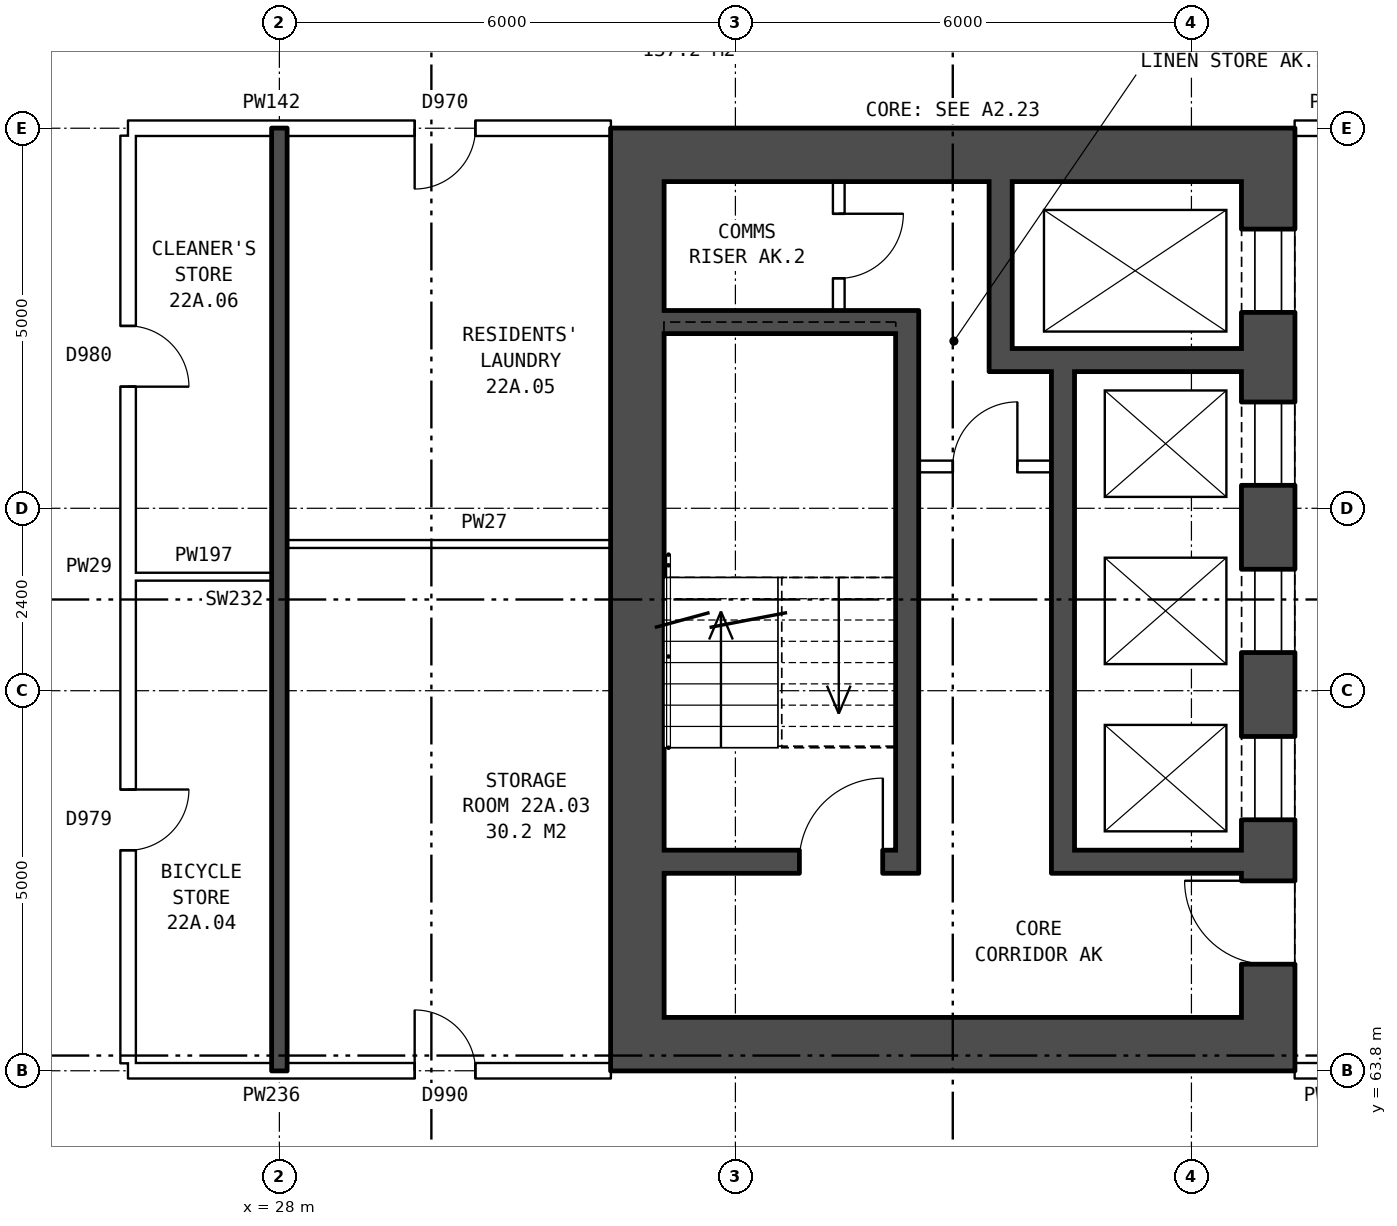
"""IFC4 building model, lengths in metres.
Left out: names, types, materials, properties, quantities, classifications, styles, units other than length and angle.
Written with IfcOpenShell. Run it as: python <this file> out.ifc"""

import sys

from ifc_helpers import new_model, si_unit, direction, frame, frame_2d, origin, place, context, subcontext, project, spatial, rectangle, extrude, element, fill, save


model = new_model("IFC4")
c1 = context("Model", 3, precision=1e-05, world=origin(), true_north=direction((0.0, 1.0)))
c2 = subcontext(c1, "Body", "Model", "MODEL_VIEW")
j1 = project(units=[si_unit("LENGTHUNIT", "METRE"), si_unit("PLANEANGLEUNIT", "RADIAN")], contexts=[c1])
p1 = place(None, origin())
s1 = spatial("IfcSite", under=j1, at=p1, CompositionType="ELEMENT")
p2 = place(p1, origin())
s2 = spatial("IfcBuilding", under=s1, at=p2, CompositionType="ELEMENT")
p3 = place(p2, frame((0.0, 0.0, 80.9)))
s3 = spatial("IfcBuildingStorey", under=s2, at=p3, CompositionType="ELEMENT", Elevation=80.9)
p4 = place(p3, frame((41.01, 75.5, 0.0), z_axis=(0.0, 0.0, 1.0), x_axis=(0.0, -1.0, 0.0)))
e1 = element("IfcWall", 1, at=p4, inside=s3, PredefinedType="SHEAR", context=c2, shape_type="SweptSolid", body=[
    extrude(rectangle(XDim=11.0, YDim=0.7, at=frame_2d((5.5, 0.0))), origin(), (0.0, 0.0, 1.0), 2.85),
])
p5 = place(p4, frame((0.625, 0.0, 0.0)))
e2 = element("IfcOpeningElement", 2, at=p5, cuts=e1, PredefinedType="OPENING", context=c2, shape_type="SweptSolid", body=[
    extrude(rectangle(XDim=1.1, YDim=2.1, at=frame_2d((0.55, 1.05))), frame((0.0, 0.36, 0.0), z_axis=(0.0, -1.0, 0.0), x_axis=(1.0, 0.0, 0.0)), (0.0, 0.0, 1.0), 0.72),
])
p6 = place(p4, frame((2.9, 0.0, 0.0)))
e3 = element("IfcOpeningElement", 3, at=p6, cuts=e1, PredefinedType="OPENING", context=c2, shape_type="SweptSolid", body=[
    extrude(rectangle(XDim=1.1, YDim=2.1, at=frame_2d((0.55, 1.05))), frame((0.0, 0.36, 0.0), z_axis=(0.0, -1.0, 0.0), x_axis=(1.0, 0.0, 0.0)), (0.0, 0.0, 1.0), 0.72),
])
p7 = place(p4, frame((5.1, 0.0, 0.0)))
e4 = element("IfcOpeningElement", 4, at=p7, cuts=e1, PredefinedType="OPENING", context=c2, shape_type="SweptSolid", body=[
    extrude(rectangle(XDim=1.1, YDim=2.1, at=frame_2d((0.55, 1.05))), frame((0.0, 0.36, 0.0), z_axis=(0.0, -1.0, 0.0), x_axis=(1.0, 0.0, 0.0)), (0.0, 0.0, 1.0), 0.72),
])
p8 = place(p4, frame((7.3, 0.0, 0.0)))
e5 = element("IfcOpeningElement", 5, at=p8, cuts=e1, PredefinedType="OPENING", context=c2, shape_type="SweptSolid", body=[
    extrude(rectangle(XDim=1.1, YDim=2.1, at=frame_2d((0.55, 1.05))), frame((0.0, 0.36, 0.0), z_axis=(0.0, -1.0, 0.0), x_axis=(1.0, 0.0, 0.0)), (0.0, 0.0, 1.0), 0.72),
])
p9 = place(p4, frame((9.2, 0.0, 0.0)))
e6 = element("IfcOpeningElement", 6, at=p9, cuts=e1, PredefinedType="OPENING", context=c2, shape_type="SweptSolid", body=[
    extrude(rectangle(XDim=1.1, YDim=2.1, at=frame_2d((0.55, 1.05))), frame((0.0, 0.36, 0.0), z_axis=(0.0, -1.0, 0.0), x_axis=(1.0, 0.0, 0.0)), (0.0, 0.0, 1.0), 0.72),
])
p10 = place(p3, frame((32.71, 75.5, 0.0), z_axis=(0.0, 0.0, 1.0), x_axis=(0.0, -1.0, 0.0)))
e7 = element("IfcWall", 7, at=p10, inside=s3, PredefinedType="SHEAR", context=c2, shape_type="SweptSolid", body=[
    extrude(rectangle(XDim=11.0, YDim=0.7, at=frame_2d((5.5, 0.0))), origin(), (0.0, 0.0, 1.0), 2.85),
])
for number, where, z_axis, x_axis in (
    (8, (41.36, 75.85, 0.0), (0.0, 0.0, 1.0), (-1.0, 0.0, 0.0)),
    (9, (41.36, 64.15, 0.0), (0.0, 0.0, 1.0), (-1.0, 0.0, 0.0)),
):
    element("IfcWall", number, at=place(p3, frame(where, z_axis=z_axis, x_axis=x_axis)), inside=s3, PredefinedType="SHEAR", context=c2, shape_type="SweptSolid", body=[
        extrude(rectangle(XDim=9.0, YDim=0.7, at=frame_2d((4.5, 0.0))), origin(), (0.0, 0.0, 1.0), 2.85),
    ])
p11 = place(p3, frame((36.11, 73.65, 0.0), z_axis=(0.0, 0.0, 1.0), x_axis=(-1.0, 0.0, 0.0)))
e10 = element("IfcWall", 10, at=p11, inside=s3, PredefinedType="SHEAR", context=c2, shape_type="SweptSolid", body=[
    extrude(rectangle(XDim=3.05, YDim=0.3, at=frame_2d((1.525, 0.0))), origin(), (0.0, 0.0, 1.0), 2.85),
])
p12 = place(p3, frame((40.66, 73.15, 0.0), z_axis=(0.0, 0.0, 1.0), x_axis=(-1.0, 0.0, 0.0)))
e11 = element("IfcWall", 11, at=p12, inside=s3, PredefinedType="SHEAR", context=c2, shape_type="SweptSolid", body=[
    extrude(rectangle(XDim=3.32, YDim=0.3, at=frame_2d((1.66, 0.0))), origin(), (0.0, 0.0, 1.0), 2.85),
])
p13 = place(p3, frame((38.16, 71.75, 0.0), z_axis=(0.0, 0.0, 1.0), x_axis=(-1.0, 0.0, 0.0)))
e12 = element("IfcWall", 12, at=p13, inside=s3, PredefinedType="PARTITIONING", context=c2, shape_type="SweptSolid", body=[
    extrude(rectangle(XDim=1.75, YDim=0.15, at=frame_2d((0.875, 0.0))), origin(), (0.0, 0.0, 1.0), 2.85),
])
p14 = place(p13, frame((0.45, 0.0, 0.0)))
e13 = element("IfcOpeningElement", 13, at=p14, cuts=e12, PredefinedType="OPENING", context=c2, shape_type="SweptSolid", body=[
    extrude(rectangle(XDim=0.85, YDim=2.1, at=frame_2d((0.425, 1.05))), frame((0.0, 0.085, 0.0), z_axis=(0.0, -1.0, 0.0), x_axis=(1.0, 0.0, 0.0)), (0.0, 0.0, 1.0), 0.17),
])
p15 = place(p3, frame((40.66, 66.55, 0.0), z_axis=(0.0, 0.0, 1.0), x_axis=(-1.0, 0.0, 0.0)))
e14 = element("IfcWall", 14, at=p15, inside=s3, PredefinedType="SHEAR", context=c2, shape_type="SweptSolid", body=[
    extrude(rectangle(XDim=2.2, YDim=0.3, at=frame_2d((1.1, 0.0))), origin(), (0.0, 0.0, 1.0), 2.85),
])
p16 = place(p3, frame((36.11, 66.55, 0.0), z_axis=(0.0, 0.0, 1.0), x_axis=(-1.0, 0.0, 0.0)))
e15 = element("IfcWall", 15, at=p16, inside=s3, PredefinedType="SHEAR", context=c2, shape_type="SweptSolid", body=[
    extrude(rectangle(XDim=3.05, YDim=0.3, at=frame_2d((1.525, 0.0))), origin(), (0.0, 0.0, 1.0), 2.85),
])
p17 = place(p16, frame((0.17, 0.0, 0.0)))
e16 = element("IfcOpeningElement", 16, at=p17, cuts=e15, PredefinedType="OPENING", context=c2, shape_type="SweptSolid", body=[
    extrude(rectangle(XDim=1.1, YDim=2.1, at=frame_2d((0.55, 1.05))), frame((0.0, 0.16, 0.0), z_axis=(0.0, -1.0, 0.0), x_axis=(1.0, 0.0, 0.0)), (0.0, 0.0, 1.0), 0.32),
])
p18 = place(p3, frame((38.31, 73.0, 0.0), z_axis=(0.0, 0.0, 1.0), x_axis=(0.0, -1.0, 0.0)))
e17 = element("IfcWall", 17, at=p18, inside=s3, PredefinedType="SHEAR", context=c2, shape_type="SweptSolid", body=[
    extrude(rectangle(XDim=6.6, YDim=0.3, at=frame_2d((3.3, 0.0))), origin(), (0.0, 0.0, 1.0), 2.85),
])
p19 = place(p3, frame((37.49, 75.5, 0.0), z_axis=(0.0, 0.0, 1.0), x_axis=(0.0, -1.0, 0.0)))
e18 = element("IfcWall", 18, at=p19, inside=s3, PredefinedType="SHEAR", context=c2, shape_type="SweptSolid", body=[
    extrude(rectangle(XDim=2.2, YDim=0.3, at=frame_2d((1.1, 0.0))), origin(), (0.0, 0.0, 1.0), 2.85),
])
p20 = place(p3, frame((36.26, 73.8, 0.0), z_axis=(0.0, 0.0, 1.0), x_axis=(0.0, -1.0, 0.0)))
e19 = element("IfcWall", 19, at=p20, inside=s3, PredefinedType="SHEAR", context=c2, shape_type="SweptSolid", body=[
    extrude(rectangle(XDim=7.4, YDim=0.3, at=frame_2d((3.7, 0.0))), origin(), (0.0, 0.0, 1.0), 2.85),
])
p21 = place(p3, frame((35.36, 75.5, 0.0), z_axis=(0.0, 0.0, 1.0), x_axis=(0.0, -1.0, 0.0)))
e20 = element("IfcWall", 20, at=p21, inside=s3, PredefinedType="PARTITIONING", context=c2, shape_type="SweptSolid", body=[
    extrude(rectangle(XDim=1.7, YDim=0.15, at=frame_2d((0.85, 0.0))), origin(), (0.0, 0.0, 1.0), 2.85),
])
p22 = place(p21, frame((0.425, 0.0, 0.0)))
e21 = element("IfcOpeningElement", 21, at=p22, cuts=e20, PredefinedType="OPENING", context=c2, shape_type="SweptSolid", body=[
    extrude(rectangle(XDim=0.85, YDim=2.1, at=frame_2d((0.425, 1.05))), frame((0.0, 0.085, 0.0), z_axis=(0.0, -1.0, 0.0), x_axis=(1.0, 0.0, 0.0)), (0.0, 0.0, 1.0), 0.17),
])
p23 = place(p3, frame((26.01, 63.8, 0.0), z_axis=(0.0, 0.0, 1.0), x_axis=(1.0, 0.0, 0.0)))
e22 = element("IfcWall", 22, at=p23, inside=s3, PredefinedType="PARTITIONING", context=c2, shape_type="SweptSolid", body=[
    extrude(rectangle(XDim=6.35, YDim=0.2, at=frame_2d((3.175, 0.0))), origin(), (0.0, 0.0, 1.0), 2.85),
])
p24 = place(p23, frame((3.77, 0.0, 0.0)))
e23 = element("IfcOpeningElement", 23, at=p24, cuts=e22, PredefinedType="OPENING", context=c2, shape_type="SweptSolid", body=[
    extrude(rectangle(XDim=0.8, YDim=2.1, at=frame_2d((0.4, 1.05))), frame((0.0, 0.11, 0.0), z_axis=(0.0, -1.0, 0.0), x_axis=(1.0, 0.0, 0.0)), (0.0, 0.0, 1.0), 0.22),
])
p25 = place(p3, frame((41.36, 63.8, 0.0), z_axis=(0.0, 0.0, 1.0), x_axis=(1.0, 0.0, 0.0)))
e24 = element("IfcWall", 24, at=p25, inside=s3, PredefinedType="PARTITIONING", context=c2, shape_type="SweptSolid", body=[
    extrude(rectangle(XDim=3.0, YDim=0.2, at=frame_2d((1.5, 0.0))), origin(), (0.0, 0.0, 1.0), 2.85),
])
p26 = place(p25, frame((1.0, 0.0, 0.0)))
e25 = element("IfcOpeningElement", 25, at=p26, cuts=e24, PredefinedType="OPENING", context=c2, shape_type="SweptSolid", body=[
    extrude(rectangle(XDim=1.0, YDim=2.1, at=frame_2d((0.5, 1.05))), frame((0.0, 0.11, 0.0), z_axis=(0.0, -1.0, 0.0), x_axis=(1.0, 0.0, 0.0)), (0.0, 0.0, 1.0), 0.22),
])
p27 = place(p3, frame((26.11, 70.3, 0.0), z_axis=(0.0, 0.0, 1.0), x_axis=(1.0, 0.0, 0.0)))
e26 = element("IfcWall", 26, at=p27, inside=s3, PredefinedType="PARTITIONING", context=c2, shape_type="SweptSolid", body=[
    extrude(rectangle(XDim=1.79, YDim=0.1, at=frame_2d((0.895, 0.0))), origin(), (0.0, 0.0, 1.0), 2.85),
])
p28 = place(p3, frame((28.1, 70.73, 0.0), z_axis=(0.0, 0.0, 1.0), x_axis=(1.0, 0.0, 0.0)))
e27 = element("IfcWall", 27, at=p28, inside=s3, PredefinedType="PARTITIONING", context=c2, shape_type="SweptSolid", body=[
    extrude(rectangle(XDim=4.26, YDim=0.1, at=frame_2d((2.13, 0.0))), origin(), (0.0, 0.0, 1.0), 2.85),
])
p29 = place(p3, frame((26.01, 76.2, 0.0), z_axis=(0.0, 0.0, 1.0), x_axis=(1.0, 0.0, 0.0)))
e28 = element("IfcWall", 28, at=p29, inside=s3, PredefinedType="PARTITIONING", context=c2, shape_type="SweptSolid", body=[
    extrude(rectangle(XDim=6.35, YDim=0.2, at=frame_2d((3.175, 0.0))), origin(), (0.0, 0.0, 1.0), 2.85),
])
p30 = place(p29, frame((3.77, 0.0, 0.0)))
e29 = element("IfcOpeningElement", 29, at=p30, cuts=e28, PredefinedType="OPENING", context=c2, shape_type="SweptSolid", body=[
    extrude(rectangle(XDim=0.8, YDim=2.1, at=frame_2d((0.4, 1.05))), frame((0.0, 0.11, 0.0), z_axis=(0.0, -1.0, 0.0), x_axis=(1.0, 0.0, 0.0)), (0.0, 0.0, 1.0), 0.22),
])
p31 = place(p3, frame((41.36, 76.2, 0.0), z_axis=(0.0, 0.0, 1.0), x_axis=(1.0, 0.0, 0.0)))
e30 = element("IfcWall", 30, at=p31, inside=s3, PredefinedType="PARTITIONING", context=c2, shape_type="SweptSolid", body=[
    extrude(rectangle(XDim=3.0, YDim=0.2, at=frame_2d((1.5, 0.0))), origin(), (0.0, 0.0, 1.0), 2.85),
])
p32 = place(p31, frame((1.0, 0.0, 0.0)))
e31 = element("IfcOpeningElement", 31, at=p32, cuts=e30, PredefinedType="OPENING", context=c2, shape_type="SweptSolid", body=[
    extrude(rectangle(XDim=1.0, YDim=2.1, at=frame_2d((0.5, 1.05))), frame((0.0, 0.11, 0.0), z_axis=(0.0, -1.0, 0.0), x_axis=(1.0, 0.0, 0.0)), (0.0, 0.0, 1.0), 0.22),
])
p33 = place(p3, frame((26.01, 63.9, 0.0), z_axis=(0.0, 0.0, 1.0), x_axis=(0.0, 1.0, 0.0)))
e32 = element("IfcWall", 32, at=p33, inside=s3, PredefinedType="PARTITIONING", context=c2, shape_type="SweptSolid", body=[
    extrude(rectangle(XDim=12.2, YDim=0.2, at=frame_2d((6.1, 0.0))), origin(), (0.0, 0.0, 1.0), 2.85),
])
p34 = place(p33, frame((2.8, 0.0, 0.0)))
e33 = element("IfcOpeningElement", 33, at=p34, cuts=e32, PredefinedType="OPENING", context=c2, shape_type="SweptSolid", body=[
    extrude(rectangle(XDim=0.8, YDim=2.1, at=frame_2d((0.4, 1.05))), frame((0.0, 0.11, 0.0), z_axis=(0.0, -1.0, 0.0), x_axis=(1.0, 0.0, 0.0)), (0.0, 0.0, 1.0), 0.22),
])
p35 = place(p33, frame((8.9, 0.0, 0.0)))
e34 = element("IfcOpeningElement", 34, at=p35, cuts=e32, PredefinedType="OPENING", context=c2, shape_type="SweptSolid", body=[
    extrude(rectangle(XDim=0.8, YDim=2.1, at=frame_2d((0.4, 1.05))), frame((0.0, 0.11, 0.0), z_axis=(0.0, -1.0, 0.0), x_axis=(1.0, 0.0, 0.0)), (0.0, 0.0, 1.0), 0.22),
])
p36 = place(p3, frame((28.0, 63.8, 0.0), z_axis=(0.0, 0.0, 1.0), x_axis=(0.0, 1.0, 0.0)))
e35 = element("IfcWall", 35, at=p36, inside=s3, PredefinedType="SOLIDWALL", context=c2, shape_type="SweptSolid", body=[
    extrude(rectangle(XDim=12.4, YDim=0.2, at=frame_2d((6.2, 0.0))), origin(), (0.0, 0.0, 1.0), 2.85),
])
p37 = place(p5, origin())
e36 = element("IfcDoor", 36, at=p37, inside=s3, OperationType="DOUBLE_DOOR_SLIDING", PredefinedType="DOOR", context=c2, shape_type="SweptSolid", body=[
    extrude(rectangle(XDim=1.1, YDim=2.1, at=frame_2d((0.55, 1.05))), frame((0.0, -0.285, 0.0), z_axis=(0.0, -1.0, 0.0), x_axis=(1.0, 0.0, 0.0)), (0.0, 0.0, 1.0), 0.05),
])
fill(e2, e36)
p38 = place(p6, origin())
e37 = element("IfcDoor", 37, at=p38, inside=s3, OperationType="DOUBLE_DOOR_SLIDING", PredefinedType="DOOR", context=c2, shape_type="SweptSolid", body=[
    extrude(rectangle(XDim=1.1, YDim=2.1, at=frame_2d((0.55, 1.05))), frame((0.0, -0.285, 0.0), z_axis=(0.0, -1.0, 0.0), x_axis=(1.0, 0.0, 0.0)), (0.0, 0.0, 1.0), 0.05),
])
fill(e3, e37)
p39 = place(p7, origin())
e38 = element("IfcDoor", 38, at=p39, inside=s3, OperationType="DOUBLE_DOOR_SLIDING", PredefinedType="DOOR", context=c2, shape_type="SweptSolid", body=[
    extrude(rectangle(XDim=1.1, YDim=2.1, at=frame_2d((0.55, 1.05))), frame((0.0, -0.285, 0.0), z_axis=(0.0, -1.0, 0.0), x_axis=(1.0, 0.0, 0.0)), (0.0, 0.0, 1.0), 0.05),
])
fill(e4, e38)
p40 = place(p8, origin())
e39 = element("IfcDoor", 39, at=p40, inside=s3, OperationType="DOUBLE_DOOR_SLIDING", PredefinedType="DOOR", context=c2, shape_type="SweptSolid", body=[
    extrude(rectangle(XDim=1.1, YDim=2.1, at=frame_2d((0.55, 1.05))), frame((0.0, -0.285, 0.0), z_axis=(0.0, -1.0, 0.0), x_axis=(1.0, 0.0, 0.0)), (0.0, 0.0, 1.0), 0.05),
])
fill(e5, e39)
p41 = place(p9, frame((1.1, 0.0, 0.0), z_axis=(0.0, 0.0, 1.0), x_axis=(-1.0, 0.0, 0.0)))
e40 = element("IfcDoor", 40, at=p41, inside=s3, OperationType="SINGLE_SWING_RIGHT", PredefinedType="DOOR", context=c2, shape_type="SweptSolid", body=[
    extrude(rectangle(XDim=1.1, YDim=2.1, at=frame_2d((0.55, 1.05))), frame((0.0, 0.335, 0.0), z_axis=(0.0, -1.0, 0.0), x_axis=(1.0, 0.0, 0.0)), (0.0, 0.0, 1.0), 0.05),
])
fill(e6, e40)
p42 = place(p17, frame((1.1, 0.0, 0.0), z_axis=(0.0, 0.0, 1.0), x_axis=(-1.0, 0.0, 0.0)))
e41 = element("IfcDoor", 41, at=p42, inside=s3, OperationType="SINGLE_SWING_RIGHT", PredefinedType="DOOR", context=c2, shape_type="SweptSolid", body=[
    extrude(rectangle(XDim=1.1, YDim=2.1, at=frame_2d((0.55, 1.05))), frame((0.0, 0.025, 0.0), z_axis=(0.0, -1.0, 0.0), x_axis=(1.0, 0.0, 0.0)), (0.0, 0.0, 1.0), 0.05),
])
fill(e16, e41)
p43 = place(p14, frame((0.85, 0.0, 0.0), z_axis=(0.0, 0.0, 1.0), x_axis=(-1.0, 0.0, 0.0)))
e42 = element("IfcDoor", 42, at=p43, inside=s3, OperationType="SINGLE_SWING_RIGHT", PredefinedType="DOOR", context=c2, shape_type="SweptSolid", body=[
    extrude(rectangle(XDim=0.85, YDim=2.1, at=frame_2d((0.425, 1.05))), frame((0.0, 0.025, 0.0), z_axis=(0.0, -1.0, 0.0), x_axis=(1.0, 0.0, 0.0)), (0.0, 0.0, 1.0), 0.05),
])
fill(e13, e42)
p44 = place(p22, origin())
e43 = element("IfcDoor", 43, at=p44, inside=s3, OperationType="SINGLE_SWING_LEFT", PredefinedType="DOOR", context=c2, shape_type="SweptSolid", body=[
    extrude(rectangle(XDim=0.85, YDim=2.1, at=frame_2d((0.425, 1.05))), frame((0.0, 0.025, 0.0), z_axis=(0.0, -1.0, 0.0), x_axis=(1.0, 0.0, 0.0)), (0.0, 0.0, 1.0), 0.05),
])
fill(e21, e43)
p45 = place(p24, origin())
e44 = element("IfcDoor", 44, at=p45, inside=s3, OperationType="SINGLE_SWING_LEFT", PredefinedType="DOOR", context=c2, shape_type="SweptSolid", body=[
    extrude(rectangle(XDim=0.8, YDim=2.1, at=frame_2d((0.4, 1.05))), frame((0.0, 0.025, 0.0), z_axis=(0.0, -1.0, 0.0), x_axis=(1.0, 0.0, 0.0)), (0.0, 0.0, 1.0), 0.05),
])
fill(e23, e44)
p46 = place(p34, frame((0.8, 0.0, 0.0), z_axis=(0.0, 0.0, 1.0), x_axis=(-1.0, 0.0, 0.0)))
e45 = element("IfcDoor", 45, at=p46, inside=s3, OperationType="SINGLE_SWING_LEFT", PredefinedType="DOOR", context=c2, shape_type="SweptSolid", body=[
    extrude(rectangle(XDim=0.8, YDim=2.1, at=frame_2d((0.4, 1.05))), frame((0.0, 0.025, 0.0), z_axis=(0.0, -1.0, 0.0), x_axis=(1.0, 0.0, 0.0)), (0.0, 0.0, 1.0), 0.05),
])
fill(e33, e45)
p47 = place(p30, frame((0.8, 0.0, 0.0), z_axis=(0.0, 0.0, 1.0), x_axis=(-1.0, 0.0, 0.0)))
e46 = element("IfcDoor", 46, at=p47, inside=s3, OperationType="SINGLE_SWING_RIGHT", PredefinedType="DOOR", context=c2, shape_type="SweptSolid", body=[
    extrude(rectangle(XDim=0.8, YDim=2.1, at=frame_2d((0.4, 1.05))), frame((0.0, 0.025, 0.0), z_axis=(0.0, -1.0, 0.0), x_axis=(1.0, 0.0, 0.0)), (0.0, 0.0, 1.0), 0.05),
])
fill(e29, e46)
p48 = place(p35, frame((0.8, 0.0, 0.0), z_axis=(0.0, 0.0, 1.0), x_axis=(-1.0, 0.0, 0.0)))
e47 = element("IfcDoor", 47, at=p48, inside=s3, OperationType="SINGLE_SWING_RIGHT", PredefinedType="DOOR", context=c2, shape_type="SweptSolid", body=[
    extrude(rectangle(XDim=0.8, YDim=2.1, at=frame_2d((0.4, 1.05))), frame((0.0, 0.025, 0.0), z_axis=(0.0, -1.0, 0.0), x_axis=(1.0, 0.0, 0.0)), (0.0, 0.0, 1.0), 0.05),
])
fill(e34, e47)
save(model, sys.argv[1])
